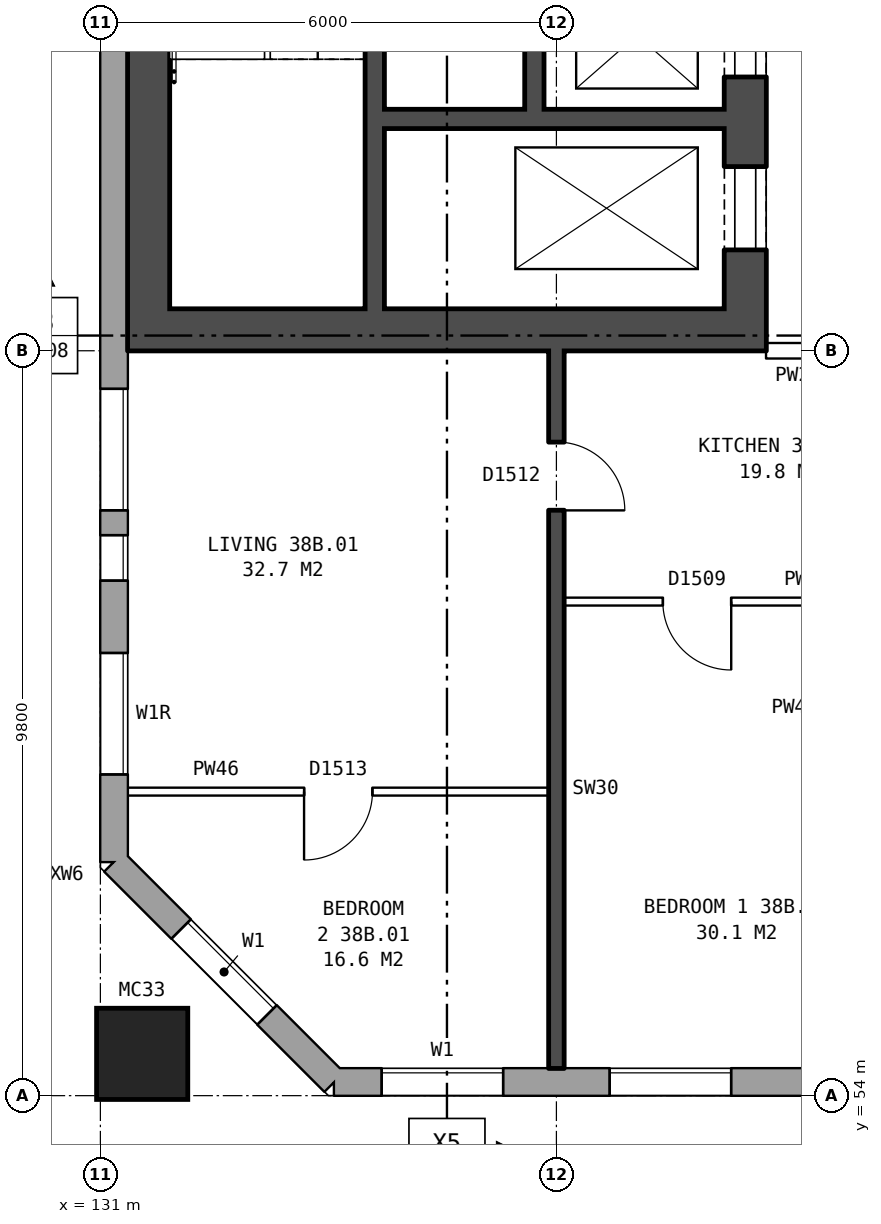
"""IFC4 building model, lengths in metres.
Left out: names, types, materials, properties, quantities, classifications, styles, units other than length and angle.
Written with IfcOpenShell. Run it as: python <this file> out.ifc"""

import sys

from ifc_helpers import new_model, si_unit, direction, frame, frame_2d, origin, origin_2d, place, context, subcontext, project, spatial, rectangle, hollow_rectangle, extrude, element, fill, save


model = new_model("IFC4")
c1 = context("Model", 3, precision=1e-05, world=origin(), true_north=direction((0.0, 1.0)))
c2 = subcontext(c1, "Body", "Model", "MODEL_VIEW")
j1 = project(units=[si_unit("LENGTHUNIT", "METRE"), si_unit("PLANEANGLEUNIT", "RADIAN")], contexts=[c1])
p1 = place(None, origin())
s1 = spatial("IfcSite", under=j1, at=p1, CompositionType="ELEMENT")
p2 = place(p1, origin())
s2 = spatial("IfcBuilding", under=s1, at=p2, CompositionType="ELEMENT")
p3 = place(p2, frame((0.0, 0.0, 136.1)))
s3 = spatial("IfcBuildingStorey", under=s2, at=p3, CompositionType="ELEMENT", Elevation=136.1)
p4 = place(p3, frame((131.55, 54.55, 0.0), z_axis=(0.0, 0.0, 1.0), x_axis=(1.0, 0.0, 0.0)))
e1 = element("IfcColumn", 1, at=p4, inside=s3, PredefinedType="COLUMN", context=c2, shape_type="SweptSolid", body=[
    extrude(hollow_rectangle(XDim=1.2, YDim=1.2, WallThickness=0.065, at=origin_2d()), origin(), (0.0, 0.0, 1.0), 3.1),
])
p5 = place(p3, frame((131.18, 57.075, 0.0), z_axis=(0.0, 0.0, 1.0), x_axis=(0.707106781187, -0.707106781187, 0.0)))
e2 = element("IfcWall", 2, at=p5, inside=s3, PredefinedType="STANDARD", context=c2, shape_type="SweptSolid", body=[
    extrude(rectangle(XDim=4.094, YDim=0.36, at=frame_2d((2.047, 0.0))), origin(), (0.0, 0.0, 1.0), 2.85),
])
p6 = place(p5, frame((1.247, 0.0, 0.8)))
e3 = element("IfcOpeningElement", 3, at=p6, cuts=e2, PredefinedType="OPENING", context=c2, shape_type="SweptSolid", body=[
    extrude(rectangle(XDim=1.6, YDim=1.8, at=frame_2d((0.8, 0.9))), frame((0.0, 0.19, 0.0), z_axis=(0.0, -1.0, 0.0), x_axis=(1.0, 0.0, 0.0)), (0.0, 0.0, 1.0), 0.38),
])
p7 = place(p3, frame((134.075, 54.18, 0.0), z_axis=(0.0, 0.0, 1.0), x_axis=(1.0, 0.0, 0.0)))
e4 = element("IfcWall", 4, at=p7, inside=s3, PredefinedType="STANDARD", context=c2, shape_type="SweptSolid", body=[
    extrude(rectangle(XDim=35.601, YDim=0.36, at=frame_2d((17.8, 0.0))), origin(), (0.0, 0.0, 1.0), 2.85),
])
p8 = place(p7, frame((0.625, 0.0, 0.8)))
e5 = element("IfcOpeningElement", 5, at=p8, cuts=e4, PredefinedType="OPENING", context=c2, shape_type="SweptSolid", body=[
    extrude(rectangle(XDim=1.6, YDim=1.8, at=frame_2d((0.8, 0.9))), frame((0.0, 0.19, 0.0), z_axis=(0.0, -1.0, 0.0), x_axis=(1.0, 0.0, 0.0)), (0.0, 0.0, 1.0), 0.38),
])
p9 = place(p7, frame((3.625, 0.0, 0.8)))
e6 = element("IfcOpeningElement", 6, at=p9, cuts=e4, PredefinedType="OPENING", context=c2, shape_type="SweptSolid", body=[
    extrude(rectangle(XDim=1.6, YDim=1.8, at=frame_2d((0.8, 0.9))), frame((0.0, 0.19, 0.0), z_axis=(0.0, -1.0, 0.0), x_axis=(1.0, 0.0, 0.0)), (0.0, 0.0, 1.0), 0.38),
])
p10 = place(p7, frame((6.625, 0.0, 0.8)))
e7 = element("IfcOpeningElement", 7, at=p10, cuts=e4, PredefinedType="OPENING", context=c2, shape_type="SweptSolid", body=[
    extrude(rectangle(XDim=1.6, YDim=1.8, at=frame_2d((0.8, 0.9))), frame((0.0, 0.19, 0.0), z_axis=(0.0, -1.0, 0.0), x_axis=(1.0, 0.0, 0.0)), (0.0, 0.0, 1.0), 0.38),
])
p11 = place(p7, frame((9.625, 0.0, 0.8)))
e8 = element("IfcOpeningElement", 8, at=p11, cuts=e4, PredefinedType="OPENING", context=c2, shape_type="SweptSolid", body=[
    extrude(rectangle(XDim=1.6, YDim=1.8, at=frame_2d((0.8, 0.9))), frame((0.0, 0.19, 0.0), z_axis=(0.0, -1.0, 0.0), x_axis=(1.0, 0.0, 0.0)), (0.0, 0.0, 1.0), 0.38),
])
p12 = place(p7, frame((12.075, 0.0, 1.05)))
e9 = element("IfcOpeningElement", 9, at=p12, cuts=e4, PredefinedType="OPENING", context=c2, shape_type="SweptSolid", body=[
    extrude(rectangle(XDim=0.8, YDim=1.5, at=frame_2d((0.4, 0.75))), frame((0.0, 0.19, 0.0), z_axis=(0.0, -1.0, 0.0), x_axis=(1.0, 0.0, 0.0)), (0.0, 0.0, 1.0), 0.38),
])
p13 = place(p7, frame((15.625, 0.0, 0.8)))
e10 = element("IfcOpeningElement", 10, at=p13, cuts=e4, PredefinedType="OPENING", context=c2, shape_type="SweptSolid", body=[
    extrude(rectangle(XDim=1.6, YDim=1.8, at=frame_2d((0.8, 0.9))), frame((0.0, 0.19, 0.0), z_axis=(0.0, -1.0, 0.0), x_axis=(1.0, 0.0, 0.0)), (0.0, 0.0, 1.0), 0.38),
])
p14 = place(p7, frame((18.625, 0.0, 0.8)))
e11 = element("IfcOpeningElement", 11, at=p14, cuts=e4, PredefinedType="OPENING", context=c2, shape_type="SweptSolid", body=[
    extrude(rectangle(XDim=1.6, YDim=1.8, at=frame_2d((0.8, 0.9))), frame((0.0, 0.19, 0.0), z_axis=(0.0, -1.0, 0.0), x_axis=(1.0, 0.0, 0.0)), (0.0, 0.0, 1.0), 0.38),
])
p15 = place(p7, frame((22.125, 0.0, 1.7)))
e12 = element("IfcOpeningElement", 12, at=p15, cuts=e4, PredefinedType="OPENING", context=c2, shape_type="SweptSolid", body=[
    extrude(rectangle(XDim=0.6, YDim=0.9, at=frame_2d((0.3, 0.45))), frame((0.0, 0.19, 0.0), z_axis=(0.0, -1.0, 0.0), x_axis=(1.0, 0.0, 0.0)), (0.0, 0.0, 1.0), 0.38),
])
p16 = place(p7, frame((24.625, 0.0, 0.8)))
e13 = element("IfcOpeningElement", 13, at=p16, cuts=e4, PredefinedType="OPENING", context=c2, shape_type="SweptSolid", body=[
    extrude(rectangle(XDim=1.6, YDim=1.8, at=frame_2d((0.8, 0.9))), frame((0.0, 0.19, 0.0), z_axis=(0.0, -1.0, 0.0), x_axis=(1.0, 0.0, 0.0)), (0.0, 0.0, 1.0), 0.38),
])
p17 = place(p7, frame((27.625, 0.0, 0.8)))
e14 = element("IfcOpeningElement", 14, at=p17, cuts=e4, PredefinedType="OPENING", context=c2, shape_type="SweptSolid", body=[
    extrude(rectangle(XDim=1.6, YDim=1.8, at=frame_2d((0.8, 0.9))), frame((0.0, 0.19, 0.0), z_axis=(0.0, -1.0, 0.0), x_axis=(1.0, 0.0, 0.0)), (0.0, 0.0, 1.0), 0.38),
])
p18 = place(p7, frame((30.625, 0.0, 0.8)))
e15 = element("IfcOpeningElement", 15, at=p18, cuts=e4, PredefinedType="OPENING", context=c2, shape_type="SweptSolid", body=[
    extrude(rectangle(XDim=1.6, YDim=1.8, at=frame_2d((0.8, 0.9))), frame((0.0, 0.19, 0.0), z_axis=(0.0, -1.0, 0.0), x_axis=(1.0, 0.0, 0.0)), (0.0, 0.0, 1.0), 0.38),
])
p19 = place(p7, frame((33.625, 0.0, 0.8)))
e16 = element("IfcOpeningElement", 16, at=p19, cuts=e4, PredefinedType="OPENING", context=c2, shape_type="SweptSolid", body=[
    extrude(rectangle(XDim=1.6, YDim=1.8, at=frame_2d((0.8, 0.9))), frame((0.0, 0.19, 0.0), z_axis=(0.0, -1.0, 0.0), x_axis=(1.0, 0.0, 0.0)), (0.0, 0.0, 1.0), 0.38),
])
p20 = place(p7, frame((13.975, 0.0, 0.15)))
e17 = element("IfcOpeningElement", 17, at=p20, cuts=e4, PredefinedType="OPENING", context=c2, shape_type="SweptSolid", body=[
    extrude(rectangle(XDim=0.6, YDim=0.9, at=frame_2d((0.3, 0.45))), frame((0.0, 0.19, 0.0), z_axis=(0.0, -1.0, 0.0), x_axis=(1.0, 0.0, 0.0)), (0.0, 0.0, 1.0), 0.38),
])
p21 = place(p7, frame((23.025, 0.0, 0.8)))
e18 = element("IfcOpeningElement", 18, at=p21, cuts=e4, PredefinedType="OPENING", context=c2, shape_type="SweptSolid", body=[
    extrude(rectangle(XDim=1.2, YDim=1.8, at=frame_2d((0.6, 0.9))), frame((0.0, 0.19, 0.0), z_axis=(0.0, -1.0, 0.0), x_axis=(1.0, 0.0, 0.0)), (0.0, 0.0, 1.0), 0.38),
])
p22 = place(p3, frame((131.18, 82.925, 0.0), z_axis=(0.0, 0.0, 1.0), x_axis=(0.0, -1.0, 0.0)))
e19 = element("IfcWall", 19, at=p22, inside=s3, PredefinedType="STANDARD", context=c2, shape_type="SweptSolid", body=[
    extrude(rectangle(XDim=25.851, YDim=0.36, at=frame_2d((12.925, 0.0))), origin(), (0.0, 0.0, 1.0), 2.85),
])
p23 = place(p22, frame((1.075, 0.0, 0.8)))
e20 = element("IfcOpeningElement", 20, at=p23, cuts=e19, PredefinedType="OPENING", context=c2, shape_type="SweptSolid", body=[
    extrude(rectangle(XDim=1.2, YDim=1.2, at=frame_2d((0.6, 0.6))), frame((0.0, 0.19, 0.0), z_axis=(0.0, -1.0, 0.0), x_axis=(1.0, 0.0, 0.0)), (0.0, 0.0, 1.0), 0.38),
])
p24 = place(p22, frame((4.625, 0.0, 0.8)))
e21 = element("IfcOpeningElement", 21, at=p24, cuts=e19, PredefinedType="OPENING", context=c2, shape_type="SweptSolid", body=[
    extrude(rectangle(XDim=1.6, YDim=1.8, at=frame_2d((0.8, 0.9))), frame((0.0, 0.19, 0.0), z_axis=(0.0, -1.0, 0.0), x_axis=(1.0, 0.0, 0.0)), (0.0, 0.0, 1.0), 0.38),
])
p25 = place(p22, frame((19.625, 0.0, 0.8)))
e22 = element("IfcOpeningElement", 22, at=p25, cuts=e19, PredefinedType="OPENING", context=c2, shape_type="SweptSolid", body=[
    extrude(rectangle(XDim=1.6, YDim=1.8, at=frame_2d((0.8, 0.9))), frame((0.0, 0.19, 0.0), z_axis=(0.0, -1.0, 0.0), x_axis=(1.0, 0.0, 0.0)), (0.0, 0.0, 1.0), 0.38),
])
p26 = place(p22, frame((21.55, 0.0, 1.7)))
e23 = element("IfcOpeningElement", 23, at=p26, cuts=e19, PredefinedType="OPENING", context=c2, shape_type="SweptSolid", body=[
    extrude(rectangle(XDim=0.6, YDim=0.9, at=frame_2d((0.3, 0.45))), frame((0.0, 0.19, 0.0), z_axis=(0.0, -1.0, 0.0), x_axis=(1.0, 0.0, 0.0)), (0.0, 0.0, 1.0), 0.38),
])
p27 = place(p22, frame((3.675, 0.0, 1.7)))
e24 = element("IfcOpeningElement", 24, at=p27, cuts=e19, PredefinedType="OPENING", context=c2, shape_type="SweptSolid", body=[
    extrude(rectangle(XDim=0.6, YDim=0.9, at=frame_2d((0.3, 0.45))), frame((0.0, 0.19, 0.0), z_axis=(0.0, -1.0, 0.0), x_axis=(1.0, 0.0, 0.0)), (0.0, 0.0, 1.0), 0.38),
])
p28 = place(p22, frame((23.1, 0.0, 0.8)))
e25 = element("IfcOpeningElement", 25, at=p28, cuts=e19, PredefinedType="OPENING", context=c2, shape_type="SweptSolid", body=[
    extrude(rectangle(XDim=1.6, YDim=0.9, at=frame_2d((0.8, 0.45))), frame((0.0, 0.19, 0.0), z_axis=(0.0, -1.0, 0.0), x_axis=(1.0, 0.0, 0.0)), (0.0, 0.0, 1.0), 0.38),
])
p29 = place(p3, frame((139.485, 63.8, 0.0), z_axis=(0.0, 0.0, 1.0), x_axis=(0.0, 1.0, 0.0)))
e26 = element("IfcWall", 26, at=p29, inside=s3, PredefinedType="SHEAR", context=c2, shape_type="SweptSolid", body=[
    extrude(rectangle(XDim=12.4, YDim=0.55, at=frame_2d((6.2, 0.0))), origin(), (0.0, 0.0, 1.0), 2.85),
])
p30 = place(p29, frame((1.325, 0.0, 0.0)))
e27 = element("IfcOpeningElement", 27, at=p30, cuts=e26, PredefinedType="OPENING", context=c2, shape_type="SweptSolid", body=[
    extrude(rectangle(XDim=1.1, YDim=2.1, at=frame_2d((0.55, 1.05))), frame((0.0, 0.285, 0.0), z_axis=(0.0, -1.0, 0.0), x_axis=(1.0, 0.0, 0.0)), (0.0, 0.0, 1.0), 0.57),
])
p31 = place(p29, frame((3.6, 0.0, 0.0)))
e28 = element("IfcOpeningElement", 28, at=p31, cuts=e26, PredefinedType="OPENING", context=c2, shape_type="SweptSolid", body=[
    extrude(rectangle(XDim=1.1, YDim=2.1, at=frame_2d((0.55, 1.05))), frame((0.0, 0.285, 0.0), z_axis=(0.0, -1.0, 0.0), x_axis=(1.0, 0.0, 0.0)), (0.0, 0.0, 1.0), 0.57),
])
p32 = place(p29, frame((5.8, 0.0, 0.0)))
e29 = element("IfcOpeningElement", 29, at=p32, cuts=e26, PredefinedType="OPENING", context=c2, shape_type="SweptSolid", body=[
    extrude(rectangle(XDim=1.1, YDim=2.1, at=frame_2d((0.55, 1.05))), frame((0.0, 0.285, 0.0), z_axis=(0.0, -1.0, 0.0), x_axis=(1.0, 0.0, 0.0)), (0.0, 0.0, 1.0), 0.57),
])
p33 = place(p29, frame((9.9, 0.0, 0.0)))
e30 = element("IfcOpeningElement", 30, at=p33, cuts=e26, PredefinedType="OPENING", context=c2, shape_type="SweptSolid", body=[
    extrude(rectangle(XDim=1.1, YDim=2.1, at=frame_2d((0.55, 1.05))), frame((0.0, 0.285, 0.0), z_axis=(0.0, -1.0, 0.0), x_axis=(1.0, 0.0, 0.0)), (0.0, 0.0, 1.0), 0.57),
])
p34 = place(p29, frame((8.125, 0.0, 0.0)))
e31 = element("IfcOpeningElement", 31, at=p34, cuts=e26, PredefinedType="OPENING", context=c2, shape_type="SweptSolid", body=[
    extrude(rectangle(XDim=0.85, YDim=2.1, at=frame_2d((0.425, 1.05))), frame((0.0, 0.285, 0.0), z_axis=(0.0, -1.0, 0.0), x_axis=(1.0, 0.0, 0.0)), (0.0, 0.0, 1.0), 0.57),
])
p35 = place(p3, frame((131.635, 63.8, 0.0), z_axis=(0.0, 0.0, 1.0), x_axis=(0.0, 1.0, 0.0)))
e32 = element("IfcWall", 32, at=p35, inside=s3, PredefinedType="SHEAR", context=c2, shape_type="SweptSolid", body=[
    extrude(rectangle(XDim=12.4, YDim=0.55, at=frame_2d((6.2, 0.0))), origin(), (0.0, 0.0, 1.0), 2.85),
])
p36 = place(p3, frame((139.21, 64.075, 0.0), z_axis=(0.0, 0.0, 1.0), x_axis=(-1.0, 0.0, 0.0)))
e33 = element("IfcWall", 33, at=p36, inside=s3, PredefinedType="SHEAR", context=c2, shape_type="SweptSolid", body=[
    extrude(rectangle(XDim=7.3, YDim=0.55, at=frame_2d((3.65, 0.0))), origin(), (0.0, 0.0, 1.0), 2.85),
])
p37 = place(p3, frame((139.21, 66.85, 0.0), z_axis=(0.0, 0.0, 1.0), x_axis=(-1.0, 0.0, 0.0)))
e34 = element("IfcWall", 34, at=p37, inside=s3, PredefinedType="SHEAR", context=c2, shape_type="SweptSolid", body=[
    extrude(rectangle(XDim=4.475, YDim=0.25, at=frame_2d((2.237, 0.0))), origin(), (0.0, 0.0, 1.0), 2.85),
])
p38 = place(p3, frame((136.71, 66.975, 0.0), z_axis=(0.0, 0.0, 1.0), x_axis=(0.0, 1.0, 0.0)))
e35 = element("IfcWall", 35, at=p38, inside=s3, PredefinedType="SHEAR", context=c2, shape_type="SweptSolid", body=[
    extrude(rectangle(XDim=4.15, YDim=0.25, at=frame_2d((2.075, 0.0))), origin(), (0.0, 0.0, 1.0), 2.85),
])
p39 = place(p3, frame((134.61, 64.35, 0.0), z_axis=(0.0, 0.0, 1.0), x_axis=(0.0, 1.0, 0.0)))
e36 = element("IfcWall", 36, at=p39, inside=s3, PredefinedType="SHEAR", context=c2, shape_type="SweptSolid", body=[
    extrude(rectangle(XDim=6.775, YDim=0.25, at=frame_2d((3.387, 0.0))), origin(), (0.0, 0.0, 1.0), 2.85),
])
p40 = place(p3, frame((131.36, 58.0, 0.0), z_axis=(0.0, 0.0, 1.0), x_axis=(1.0, 0.0, 0.0)))
e37 = element("IfcWall", 37, at=p40, inside=s3, PredefinedType="PARTITIONING", context=c2, shape_type="SweptSolid", body=[
    extrude(rectangle(XDim=5.54, YDim=0.1, at=frame_2d((2.77, 0.0))), origin(), (0.0, 0.0, 1.0), 2.85),
])
p41 = place(p40, frame((2.32, 0.0, 0.0)))
e38 = element("IfcOpeningElement", 38, at=p41, cuts=e37, PredefinedType="OPENING", context=c2, shape_type="SweptSolid", body=[
    extrude(rectangle(XDim=0.9, YDim=2.1, at=frame_2d((0.45, 1.05))), frame((0.0, 0.06, 0.0), z_axis=(0.0, -1.0, 0.0), x_axis=(1.0, 0.0, 0.0)), (0.0, 0.0, 1.0), 0.12),
])
p42 = place(p3, frame((137.1, 60.5, 0.0), z_axis=(0.0, 0.0, 1.0), x_axis=(1.0, 0.0, 0.0)))
e39 = element("IfcWall", 39, at=p42, inside=s3, PredefinedType="PARTITIONING", context=c2, shape_type="SweptSolid", body=[
    extrude(rectangle(XDim=5.8, YDim=0.1, at=frame_2d((2.9, 0.0))), origin(), (0.0, 0.0, 1.0), 2.85),
])
p43 = place(p42, frame((1.3, 0.0, 0.0)))
e40 = element("IfcOpeningElement", 40, at=p43, cuts=e39, PredefinedType="OPENING", context=c2, shape_type="SweptSolid", body=[
    extrude(rectangle(XDim=0.9, YDim=2.1, at=frame_2d((0.45, 1.05))), frame((0.0, 0.06, 0.0), z_axis=(0.0, -1.0, 0.0), x_axis=(1.0, 0.0, 0.0)), (0.0, 0.0, 1.0), 0.12),
])
p44 = place(p42, frame((4.2, 0.0, 0.0)))
e41 = element("IfcOpeningElement", 41, at=p44, cuts=e39, PredefinedType="OPENING", context=c2, shape_type="SweptSolid", body=[
    extrude(rectangle(XDim=0.9, YDim=2.1, at=frame_2d((0.45, 1.05))), frame((0.0, 0.06, 0.0), z_axis=(0.0, -1.0, 0.0), x_axis=(1.0, 0.0, 0.0)), (0.0, 0.0, 1.0), 0.12),
])
p45 = place(p3, frame((139.76, 63.8, 0.0), z_axis=(0.0, 0.0, 1.0), x_axis=(1.0, 0.0, 0.0)))
e42 = element("IfcWall", 42, at=p45, inside=s3, PredefinedType="PARTITIONING", context=c2, shape_type="SweptSolid", body=[
    extrude(rectangle(XDim=3.0, YDim=0.2, at=frame_2d((1.5, 0.0))), origin(), (0.0, 0.0, 1.0), 2.85),
])
p46 = place(p45, frame((1.0, 0.0, 0.0)))
e43 = element("IfcOpeningElement", 43, at=p46, cuts=e42, PredefinedType="OPENING", context=c2, shape_type="SweptSolid", body=[
    extrude(rectangle(XDim=1.0, YDim=2.1, at=frame_2d((0.5, 1.05))), frame((0.0, 0.11, 0.0), z_axis=(0.0, -1.0, 0.0), x_axis=(1.0, 0.0, 0.0)), (0.0, 0.0, 1.0), 0.22),
])
p47 = place(p3, frame((137.0, 54.36, 0.0), z_axis=(0.0, 0.0, 1.0), x_axis=(0.0, 1.0, 0.0)))
e44 = element("IfcWall", 44, at=p47, inside=s3, PredefinedType="SOLIDWALL", context=c2, shape_type="SweptSolid", body=[
    extrude(rectangle(XDim=9.44, YDim=0.2, at=frame_2d((4.72, 0.0))), origin(), (0.0, 0.0, 1.0), 2.85),
])
p48 = place(p47, frame((7.34, 0.0, 0.0)))
e45 = element("IfcOpeningElement", 45, at=p48, cuts=e44, PredefinedType="OPENING", context=c2, shape_type="SweptSolid", body=[
    extrude(rectangle(XDim=0.9, YDim=2.1, at=frame_2d((0.45, 1.05))), frame((0.0, 0.11, 0.0), z_axis=(0.0, -1.0, 0.0), x_axis=(1.0, 0.0, 0.0)), (0.0, 0.0, 1.0), 0.22),
])
p49 = place(p6, origin())
e46 = element("IfcWindow", 46, at=p49, inside=s3, PartitioningType="SINGLE_PANEL", PredefinedType="WINDOW", context=c2, shape_type="SweptSolid", body=[
    extrude(rectangle(XDim=1.6, YDim=1.8, at=frame_2d((0.8, 0.9))), frame((0.0, 0.15, 0.0), z_axis=(0.0, -1.0, 0.0), x_axis=(1.0, 0.0, 0.0)), (0.0, 0.0, 1.0), 0.06),
])
fill(e3, e46)
p50 = place(p8, origin())
e47 = element("IfcWindow", 47, at=p50, inside=s3, PartitioningType="SINGLE_PANEL", PredefinedType="WINDOW", context=c2, shape_type="SweptSolid", body=[
    extrude(rectangle(XDim=1.6, YDim=1.8, at=frame_2d((0.8, 0.9))), frame((0.0, 0.15, 0.0), z_axis=(0.0, -1.0, 0.0), x_axis=(1.0, 0.0, 0.0)), (0.0, 0.0, 1.0), 0.06),
])
fill(e5, e47)
p51 = place(p9, origin())
e48 = element("IfcWindow", 48, at=p51, inside=s3, PartitioningType="SINGLE_PANEL", PredefinedType="WINDOW", context=c2, shape_type="SweptSolid", body=[
    extrude(rectangle(XDim=1.6, YDim=1.8, at=frame_2d((0.8, 0.9))), frame((0.0, 0.15, 0.0), z_axis=(0.0, -1.0, 0.0), x_axis=(1.0, 0.0, 0.0)), (0.0, 0.0, 1.0), 0.06),
])
fill(e6, e48)
p52 = place(p25, origin())
e49 = element("IfcWindow", 49, at=p52, inside=s3, PartitioningType="SINGLE_PANEL", PredefinedType="WINDOW", context=c2, shape_type="SweptSolid", body=[
    extrude(rectangle(XDim=1.6, YDim=1.8, at=frame_2d((0.8, 0.9))), frame((0.0, 0.15, 0.0), z_axis=(0.0, -1.0, 0.0), x_axis=(1.0, 0.0, 0.0)), (0.0, 0.0, 1.0), 0.06),
])
fill(e22, e49)
p53 = place(p26, origin())
e50 = element("IfcWindow", 50, at=p53, inside=s3, PartitioningType="SINGLE_PANEL", PredefinedType="WINDOW", context=c2, shape_type="SweptSolid", body=[
    extrude(rectangle(XDim=0.6, YDim=0.9, at=frame_2d((0.3, 0.45))), frame((0.0, 0.15, 0.0), z_axis=(0.0, -1.0, 0.0), x_axis=(1.0, 0.0, 0.0)), (0.0, 0.0, 1.0), 0.06),
])
fill(e23, e50)
p54 = place(p30, origin())
e51 = element("IfcDoor", 51, at=p54, inside=s3, OperationType="DOUBLE_DOOR_SLIDING", PredefinedType="DOOR", context=c2, shape_type="SweptSolid", body=[
    extrude(rectangle(XDim=1.1, YDim=2.1, at=frame_2d((0.55, 1.05))), frame((0.0, 0.26, 0.0), z_axis=(0.0, -1.0, 0.0), x_axis=(1.0, 0.0, 0.0)), (0.0, 0.0, 1.0), 0.05),
])
fill(e27, e51)
p55 = place(p31, origin())
e52 = element("IfcDoor", 52, at=p55, inside=s3, OperationType="DOUBLE_DOOR_SLIDING", PredefinedType="DOOR", context=c2, shape_type="SweptSolid", body=[
    extrude(rectangle(XDim=1.1, YDim=2.1, at=frame_2d((0.55, 1.05))), frame((0.0, 0.26, 0.0), z_axis=(0.0, -1.0, 0.0), x_axis=(1.0, 0.0, 0.0)), (0.0, 0.0, 1.0), 0.05),
])
fill(e28, e52)
p56 = place(p43, frame((0.9, 0.0, 0.0), z_axis=(0.0, 0.0, 1.0), x_axis=(-1.0, 0.0, 0.0)))
e53 = element("IfcDoor", 53, at=p56, inside=s3, OperationType="SINGLE_SWING_LEFT", PredefinedType="DOOR", context=c2, shape_type="SweptSolid", body=[
    extrude(rectangle(XDim=0.9, YDim=2.1, at=frame_2d((0.45, 1.05))), frame((0.0, 0.025, 0.0), z_axis=(0.0, -1.0, 0.0), x_axis=(1.0, 0.0, 0.0)), (0.0, 0.0, 1.0), 0.05),
])
fill(e40, e53)
p57 = place(p41, frame((0.9, 0.0, 0.0), z_axis=(0.0, 0.0, 1.0), x_axis=(-1.0, 0.0, 0.0)))
e54 = element("IfcDoor", 54, at=p57, inside=s3, OperationType="SINGLE_SWING_RIGHT", PredefinedType="DOOR", context=c2, shape_type="SweptSolid", body=[
    extrude(rectangle(XDim=0.9, YDim=2.1, at=frame_2d((0.45, 1.05))), frame((0.0, 0.025, 0.0), z_axis=(0.0, -1.0, 0.0), x_axis=(1.0, 0.0, 0.0)), (0.0, 0.0, 1.0), 0.05),
])
fill(e38, e54)
p58 = place(p48, frame((0.9, 0.0, 0.0), z_axis=(0.0, 0.0, 1.0), x_axis=(-1.0, 0.0, 0.0)))
e55 = element("IfcDoor", 55, at=p58, inside=s3, OperationType="SINGLE_SWING_RIGHT", PredefinedType="DOOR", context=c2, shape_type="SweptSolid", body=[
    extrude(rectangle(XDim=0.9, YDim=2.1, at=frame_2d((0.45, 1.05))), frame((0.0, 0.025, 0.0), z_axis=(0.0, -1.0, 0.0), x_axis=(1.0, 0.0, 0.0)), (0.0, 0.0, 1.0), 0.05),
])
fill(e45, e55)
p59 = place(p28, origin())
e56 = element("IfcWindow", 56, at=p59, inside=s3, PartitioningType="SINGLE_PANEL", PredefinedType="WINDOW", context=c2, shape_type="SweptSolid", body=[
    extrude(rectangle(XDim=1.6, YDim=0.9, at=frame_2d((0.8, 0.45))), frame((0.0, 0.15, 0.0), z_axis=(0.0, -1.0, 0.0), x_axis=(1.0, 0.0, 0.0)), (0.0, 0.0, 1.0), 0.06),
])
fill(e25, e56)
save(model, sys.argv[1])
